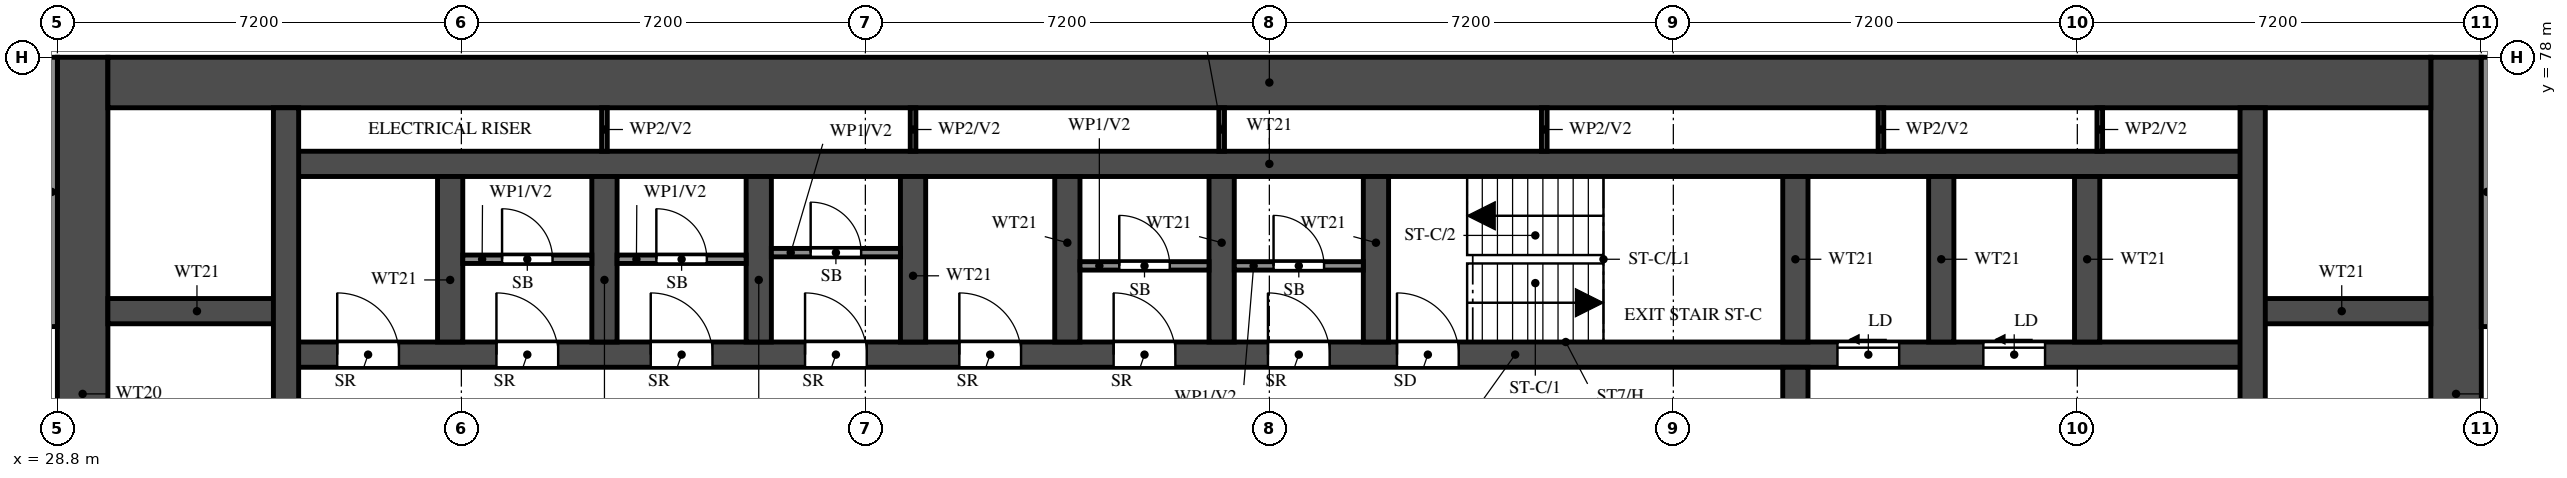
"""IFC4 building model, lengths in metres.
Left out: names, types, materials, properties, quantities, classifications, styles, units other than length and angle.
Written with IfcOpenShell. Run it as: python <this file> out.ifc"""

import sys

from ifc_helpers import new_model, si_unit, direction, frame, frame_2d, origin, place, context, subcontext, project, spatial, rectangle, extrude, element, fill, save


model = new_model("IFC4")
c1 = context("Model", 3, precision=1e-05, world=origin(), true_north=direction((0.0, 1.0)))
c2 = subcontext(c1, "Body", "Model", "MODEL_VIEW")
j1 = project(units=[si_unit("LENGTHUNIT", "METRE"), si_unit("PLANEANGLEUNIT", "RADIAN")], contexts=[c1])
p1 = place(None, origin())
s1 = spatial("IfcSite", under=j1, at=p1, CompositionType="ELEMENT")
p2 = place(p1, origin())
s2 = spatial("IfcBuilding", under=s1, at=p2, CompositionType="ELEMENT")
p3 = place(p2, frame((0.0, 0.0, 97.0)))
s3 = spatial("IfcBuildingStorey", under=s2, at=p3, CompositionType="ELEMENT", Elevation=97.0)
for number, where, z_axis, x_axis in (
    (1, (29.25, 66.0, 0.0), (0.0, 0.0, 1.0), (0.0, 1.0, 0.0)),
    (2, (71.55, 66.0, 0.0), (0.0, 0.0, 1.0), (0.0, 1.0, 0.0)),
):
    element("IfcWall", number, at=place(p3, frame(where, z_axis=z_axis, x_axis=x_axis)), inside=s3, PredefinedType="SHEAR", context=c2, shape_type="SweptSolid", body=[
        extrude(rectangle(XDim=12.0, YDim=0.9, at=frame_2d((6.0, 0.0))), origin(), (0.0, 0.0, 1.0), 3.18),
    ])
p4 = place(p3, frame((29.7, 77.55, 0.0), z_axis=(0.0, 0.0, 1.0), x_axis=(1.0, 0.0, 0.0)))
e3 = element("IfcWall", 3, at=p4, inside=s3, PredefinedType="SHEAR", context=c2, shape_type="SweptSolid", body=[
    extrude(rectangle(XDim=41.4, YDim=0.9, at=frame_2d((20.7, 0.0))), origin(), (0.0, 0.0, 1.0), 3.18),
])
p5 = place(p3, frame((32.875, 72.7, 0.0), z_axis=(0.0, 0.0, 1.0), x_axis=(1.0, 0.0, 0.0)))
e4 = element("IfcWall", 4, at=p5, inside=s3, PredefinedType="SHEAR", context=c2, shape_type="SweptSolid", body=[
    extrude(rectangle(XDim=35.05, YDim=0.45, at=frame_2d((17.525, 0.0))), origin(), (0.0, 0.0, 1.0), 3.18),
])
p6 = place(p5, frame((19.8, 0.0, 0.0)))
e5 = element("IfcOpeningElement", 5, at=p6, cuts=e4, PredefinedType="OPENING", context=c2, shape_type="SweptSolid", body=[
    extrude(rectangle(XDim=1.1, YDim=2.1, at=frame_2d((0.55, 1.05))), frame((0.0, 0.235, 0.0), z_axis=(0.0, -1.0, 0.0), x_axis=(1.0, 0.0, 0.0)), (0.0, 0.0, 1.0), 0.47),
])
p7 = place(p5, frame((27.65, 0.0, 0.0)))
e6 = element("IfcOpeningElement", 6, at=p7, cuts=e4, PredefinedType="OPENING", context=c2, shape_type="SweptSolid", body=[
    extrude(rectangle(XDim=1.1, YDim=2.1, at=frame_2d((0.55, 1.05))), frame((0.0, 0.235, 0.0), z_axis=(0.0, -1.0, 0.0), x_axis=(1.0, 0.0, 0.0)), (0.0, 0.0, 1.0), 0.47),
])
p8 = place(p5, frame((30.25, 0.0, 0.0)))
e7 = element("IfcOpeningElement", 7, at=p8, cuts=e4, PredefinedType="OPENING", context=c2, shape_type="SweptSolid", body=[
    extrude(rectangle(XDim=1.1, YDim=2.1, at=frame_2d((0.55, 1.05))), frame((0.0, 0.235, 0.0), z_axis=(0.0, -1.0, 0.0), x_axis=(1.0, 0.0, 0.0)), (0.0, 0.0, 1.0), 0.47),
])
p9 = place(p5, frame((3.75, 0.0, 0.0)))
e8 = element("IfcOpeningElement", 8, at=p9, cuts=e4, PredefinedType="OPENING", context=c2, shape_type="SweptSolid", body=[
    extrude(rectangle(XDim=1.1, YDim=2.1, at=frame_2d((0.55, 1.05))), frame((0.0, 0.235, 0.0), z_axis=(0.0, -1.0, 0.0), x_axis=(1.0, 0.0, 0.0)), (0.0, 0.0, 1.0), 0.47),
])
p10 = place(p5, frame((6.5, 0.0, 0.0)))
e9 = element("IfcOpeningElement", 9, at=p10, cuts=e4, PredefinedType="OPENING", context=c2, shape_type="SweptSolid", body=[
    extrude(rectangle(XDim=1.1, YDim=2.1, at=frame_2d((0.55, 1.05))), frame((0.0, 0.235, 0.0), z_axis=(0.0, -1.0, 0.0), x_axis=(1.0, 0.0, 0.0)), (0.0, 0.0, 1.0), 0.47),
])
p11 = place(p5, frame((9.25, 0.0, 0.0)))
e10 = element("IfcOpeningElement", 10, at=p11, cuts=e4, PredefinedType="OPENING", context=c2, shape_type="SweptSolid", body=[
    extrude(rectangle(XDim=1.1, YDim=2.1, at=frame_2d((0.55, 1.05))), frame((0.0, 0.235, 0.0), z_axis=(0.0, -1.0, 0.0), x_axis=(1.0, 0.0, 0.0)), (0.0, 0.0, 1.0), 0.47),
])
p12 = place(p5, frame((12.0, 0.0, 0.0)))
e11 = element("IfcOpeningElement", 11, at=p12, cuts=e4, PredefinedType="OPENING", context=c2, shape_type="SweptSolid", body=[
    extrude(rectangle(XDim=1.1, YDim=2.1, at=frame_2d((0.55, 1.05))), frame((0.0, 0.235, 0.0), z_axis=(0.0, -1.0, 0.0), x_axis=(1.0, 0.0, 0.0)), (0.0, 0.0, 1.0), 0.47),
])
p13 = place(p5, frame((14.75, 0.0, 0.0)))
e12 = element("IfcOpeningElement", 12, at=p13, cuts=e4, PredefinedType="OPENING", context=c2, shape_type="SweptSolid", body=[
    extrude(rectangle(XDim=1.1, YDim=2.1, at=frame_2d((0.55, 1.05))), frame((0.0, 0.235, 0.0), z_axis=(0.0, -1.0, 0.0), x_axis=(1.0, 0.0, 0.0)), (0.0, 0.0, 1.0), 0.47),
])
p14 = place(p5, frame((17.5, 0.0, 0.0)))
e13 = element("IfcOpeningElement", 13, at=p14, cuts=e4, PredefinedType="OPENING", context=c2, shape_type="SweptSolid", body=[
    extrude(rectangle(XDim=1.1, YDim=2.1, at=frame_2d((0.55, 1.05))), frame((0.0, 0.235, 0.0), z_axis=(0.0, -1.0, 0.0), x_axis=(1.0, 0.0, 0.0)), (0.0, 0.0, 1.0), 0.47),
])
p15 = place(p5, frame((0.913, 0.0, 0.0)))
e14 = element("IfcOpeningElement", 14, at=p15, cuts=e4, PredefinedType="OPENING", context=c2, shape_type="SweptSolid", body=[
    extrude(rectangle(XDim=1.1, YDim=2.1, at=frame_2d((0.55, 1.05))), frame((0.0, 0.235, 0.0), z_axis=(0.0, -1.0, 0.0), x_axis=(1.0, 0.0, 0.0)), (0.0, 0.0, 1.0), 0.47),
])
p16 = place(p3, frame((32.875, 76.1, 0.0), z_axis=(0.0, 0.0, 1.0), x_axis=(1.0, 0.0, 0.0)))
e15 = element("IfcWall", 15, at=p16, inside=s3, PredefinedType="SHEAR", context=c2, shape_type="SweptSolid", body=[
    extrude(rectangle(XDim=35.05, YDim=0.45, at=frame_2d((17.525, 0.0))), origin(), (0.0, 0.0, 1.0), 3.18),
])
for number, where, z_axis, x_axis in (
    (16, (29.7, 73.475, 0.0), (0.0, 0.0, 1.0), (1.0, 0.0, 0.0)),
    (17, (67.925, 73.475, 0.0), (0.0, 0.0, 1.0), (1.0, 0.0, 0.0)),
):
    element("IfcWall", number, at=place(p3, frame(where, z_axis=z_axis, x_axis=x_axis)), inside=s3, PredefinedType="SHEAR", context=c2, shape_type="SweptSolid", body=[
        extrude(rectangle(XDim=3.175, YDim=0.45, at=frame_2d((1.587, 0.0))), origin(), (0.0, 0.0, 1.0), 3.18),
    ])
p17 = place(p3, frame((32.875, 66.45, 0.0), z_axis=(0.0, 0.0, 1.0), x_axis=(0.0, 1.0, 0.0)))
e18 = element("IfcWall", 18, at=p17, inside=s3, PredefinedType="SHEAR", context=c2, shape_type="SweptSolid", body=[
    extrude(rectangle(XDim=10.65, YDim=0.45, at=frame_2d((5.325, 0.0))), origin(), (0.0, 0.0, 1.0), 3.18),
])
p18 = place(p3, frame((67.925, 66.45, 0.0), z_axis=(0.0, 0.0, 1.0), x_axis=(0.0, 1.0, 0.0)))
e19 = element("IfcWall", 19, at=p18, inside=s3, PredefinedType="SHEAR", context=c2, shape_type="SweptSolid", body=[
    extrude(rectangle(XDim=10.65, YDim=0.45, at=frame_2d((5.325, 0.0))), origin(), (0.0, 0.0, 1.0), 3.18),
])
p19 = place(p18, frame((0.15, 0.0, 0.0)))
e20 = element("IfcOpeningElement", 20, at=p19, cuts=e19, PredefinedType="OPENING", context=c2, shape_type="SweptSolid", body=[
    extrude(rectangle(XDim=1.1, YDim=2.1, at=frame_2d((0.55, 1.05))), frame((0.0, 0.235, 0.0), z_axis=(0.0, -1.0, 0.0), x_axis=(1.0, 0.0, 0.0)), (0.0, 0.0, 1.0), 0.47),
])
p20 = place(p3, frame((59.775, 66.45, 0.0), z_axis=(0.0, 0.0, 1.0), x_axis=(0.0, 1.0, 0.0)))
e21 = element("IfcWall", 21, at=p20, inside=s3, PredefinedType="SHEAR", context=c2, shape_type="SweptSolid", body=[
    extrude(rectangle(XDim=6.025, YDim=0.45, at=frame_2d((3.013, 0.0))), origin(), (0.0, 0.0, 1.0), 3.18),
])
p21 = place(p20, frame((3.85, 0.0, 0.0)))
e22 = element("IfcOpeningElement", 22, at=p21, cuts=e21, PredefinedType="OPENING", context=c2, shape_type="SweptSolid", body=[
    extrude(rectangle(XDim=1.2, YDim=2.1, at=frame_2d((0.6, 1.05))), frame((0.0, 0.235, 0.0), z_axis=(0.0, -1.0, 0.0), x_axis=(1.0, 0.0, 0.0)), (0.0, 0.0, 1.0), 0.47),
])
for number, where, z_axis, x_axis in (
    (23, (59.775, 72.925, 0.0), (0.0, 0.0, 1.0), (0.0, 1.0, 0.0)),
    (24, (35.8, 72.925, 0.0), (0.0, 0.0, 1.0), (0.0, 1.0, 0.0)),
    (25, (38.55, 72.925, 0.0), (0.0, 0.0, 1.0), (0.0, 1.0, 0.0)),
    (26, (41.3, 72.925, 0.0), (0.0, 0.0, 1.0), (0.0, 1.0, 0.0)),
    (27, (44.05, 72.925, 0.0), (0.0, 0.0, 1.0), (0.0, 1.0, 0.0)),
    (28, (46.8, 72.925, 0.0), (0.0, 0.0, 1.0), (0.0, 1.0, 0.0)),
    (29, (49.55, 72.925, 0.0), (0.0, 0.0, 1.0), (0.0, 1.0, 0.0)),
    (30, (52.3, 72.925, 0.0), (0.0, 0.0, 1.0), (0.0, 1.0, 0.0)),
    (31, (62.375, 72.925, 0.0), (0.0, 0.0, 1.0), (0.0, 1.0, 0.0)),
    (32, (64.975, 72.925, 0.0), (0.0, 0.0, 1.0), (0.0, 1.0, 0.0)),
):
    element("IfcWall", number, at=place(p3, frame(where, z_axis=z_axis, x_axis=x_axis)), inside=s3, PredefinedType="SHEAR", context=c2, shape_type="SweptSolid", body=[
        extrude(rectangle(XDim=2.95, YDim=0.45, at=frame_2d((1.475, 0.0))), origin(), (0.0, 0.0, 1.0), 3.18),
    ])
p22 = place(p3, frame((36.025, 74.4, 0.0), z_axis=(0.0, 0.0, 1.0), x_axis=(1.0, 0.0, 0.0)))
e33 = element("IfcWall", 33, at=p22, inside=s3, PredefinedType="PARTITIONING", context=c2, shape_type="SweptSolid", body=[
    extrude(rectangle(XDim=2.3, YDim=0.15, at=frame_2d((1.15, 0.0))), origin(), (0.0, 0.0, 1.0), 3.18),
])
p23 = place(p22, frame((0.7, 0.0, 0.0)))
e34 = element("IfcOpeningElement", 34, at=p23, cuts=e33, PredefinedType="OPENING", context=c2, shape_type="SweptSolid", body=[
    extrude(rectangle(XDim=0.9, YDim=2.1, at=frame_2d((0.45, 1.05))), frame((0.0, 0.085, 0.0), z_axis=(0.0, -1.0, 0.0), x_axis=(1.0, 0.0, 0.0)), (0.0, 0.0, 1.0), 0.17),
])
p24 = place(p3, frame((38.775, 74.4, 0.0), z_axis=(0.0, 0.0, 1.0), x_axis=(1.0, 0.0, 0.0)))
e35 = element("IfcWall", 35, at=p24, inside=s3, PredefinedType="PARTITIONING", context=c2, shape_type="SweptSolid", body=[
    extrude(rectangle(XDim=2.3, YDim=0.15, at=frame_2d((1.15, 0.0))), origin(), (0.0, 0.0, 1.0), 3.18),
])
p25 = place(p24, frame((0.7, 0.0, 0.0)))
e36 = element("IfcOpeningElement", 36, at=p25, cuts=e35, PredefinedType="OPENING", context=c2, shape_type="SweptSolid", body=[
    extrude(rectangle(XDim=0.9, YDim=2.1, at=frame_2d((0.45, 1.05))), frame((0.0, 0.085, 0.0), z_axis=(0.0, -1.0, 0.0), x_axis=(1.0, 0.0, 0.0)), (0.0, 0.0, 1.0), 0.17),
])
p26 = place(p3, frame((41.525, 74.518, 0.0), z_axis=(0.0, 0.0, 1.0), x_axis=(1.0, 0.0, 0.0)))
e37 = element("IfcWall", 37, at=p26, inside=s3, PredefinedType="PARTITIONING", context=c2, shape_type="SweptSolid", body=[
    extrude(rectangle(XDim=2.3, YDim=0.15, at=frame_2d((1.15, 0.0))), origin(), (0.0, 0.0, 1.0), 3.18),
])
p27 = place(p26, frame((0.7, 0.0, 0.0)))
e38 = element("IfcOpeningElement", 38, at=p27, cuts=e37, PredefinedType="OPENING", context=c2, shape_type="SweptSolid", body=[
    extrude(rectangle(XDim=0.9, YDim=2.1, at=frame_2d((0.45, 1.05))), frame((0.0, 0.085, 0.0), z_axis=(0.0, -1.0, 0.0), x_axis=(1.0, 0.0, 0.0)), (0.0, 0.0, 1.0), 0.17),
])
p28 = place(p3, frame((47.025, 74.282, 0.0), z_axis=(0.0, 0.0, 1.0), x_axis=(1.0, 0.0, 0.0)))
e39 = element("IfcWall", 39, at=p28, inside=s3, PredefinedType="PARTITIONING", context=c2, shape_type="SweptSolid", body=[
    extrude(rectangle(XDim=2.3, YDim=0.15, at=frame_2d((1.15, 0.0))), origin(), (0.0, 0.0, 1.0), 3.18),
])
p29 = place(p28, frame((0.7, 0.0, 0.0)))
e40 = element("IfcOpeningElement", 40, at=p29, cuts=e39, PredefinedType="OPENING", context=c2, shape_type="SweptSolid", body=[
    extrude(rectangle(XDim=0.9, YDim=2.1, at=frame_2d((0.45, 1.05))), frame((0.0, 0.085, 0.0), z_axis=(0.0, -1.0, 0.0), x_axis=(1.0, 0.0, 0.0)), (0.0, 0.0, 1.0), 0.17),
])
p30 = place(p3, frame((49.775, 74.282, 0.0), z_axis=(0.0, 0.0, 1.0), x_axis=(1.0, 0.0, 0.0)))
e41 = element("IfcWall", 41, at=p30, inside=s3, PredefinedType="PARTITIONING", context=c2, shape_type="SweptSolid", body=[
    extrude(rectangle(XDim=2.3, YDim=0.15, at=frame_2d((1.15, 0.0))), origin(), (0.0, 0.0, 1.0), 3.18),
])
p31 = place(p30, frame((0.7, 0.0, 0.0)))
e42 = element("IfcOpeningElement", 42, at=p31, cuts=e41, PredefinedType="OPENING", context=c2, shape_type="SweptSolid", body=[
    extrude(rectangle(XDim=0.9, YDim=2.1, at=frame_2d((0.45, 1.05))), frame((0.0, 0.085, 0.0), z_axis=(0.0, -1.0, 0.0), x_axis=(1.0, 0.0, 0.0)), (0.0, 0.0, 1.0), 0.17),
])
for number, where, z_axis, x_axis in (
    (43, (38.55, 76.325, 0.0), (0.0, 0.0, 1.0), (0.0, 1.0, 0.0)),
    (44, (44.05, 76.325, 0.0), (0.0, 0.0, 1.0), (0.0, 1.0, 0.0)),
    (45, (49.55, 76.325, 0.0), (0.0, 0.0, 1.0), (0.0, 1.0, 0.0)),
    (46, (55.3, 76.325, 0.0), (0.0, 0.0, 1.0), (0.0, 1.0, 0.0)),
    (47, (61.3, 76.325, 0.0), (0.0, 0.0, 1.0), (0.0, 1.0, 0.0)),
    (48, (65.2, 76.325, 0.0), (0.0, 0.0, 1.0), (0.0, 1.0, 0.0)),
):
    element("IfcWall", number, at=place(p3, frame(where, z_axis=z_axis, x_axis=x_axis)), inside=s3, PredefinedType="PARTITIONING", context=c2, shape_type="SweptSolid", body=[
        extrude(rectangle(XDim=0.775, YDim=0.1, at=frame_2d((0.388, 0.0))), origin(), (0.0, 0.0, 1.0), 3.18),
    ])
for number, where, z_axis, x_axis in (
    (49, (28.7, 73.2, 0.0), (0.0, 0.0, 1.0), (0.0, 1.0, 0.0)),
    (50, (72.1, 73.2, 0.0), (0.0, 0.0, 1.0), (0.0, 1.0, 0.0)),
):
    element("IfcWall", number, at=place(p3, frame(where, z_axis=z_axis, x_axis=x_axis)), inside=s3, PredefinedType="SOLIDWALL", context=c2, shape_type="SweptSolid", body=[
        extrude(rectangle(XDim=4.8, YDim=0.2, at=frame_2d((2.4, 0.0))), origin(), (0.0, 0.0, 1.0), 3.18),
    ])
p32 = place(p6, origin())
e51 = element("IfcDoor", 51, at=p32, inside=s3, OperationType="SINGLE_SWING_LEFT", PredefinedType="DOOR", context=c2, shape_type="SweptSolid", body=[
    extrude(rectangle(XDim=1.1, YDim=2.1, at=frame_2d((0.55, 1.05))), frame((0.0, 0.025, 0.0), z_axis=(0.0, -1.0, 0.0), x_axis=(1.0, 0.0, 0.0)), (0.0, 0.0, 1.0), 0.05),
])
fill(e5, e51)
p33 = place(p7, origin())
e52 = element("IfcDoor", 52, at=p33, inside=s3, OperationType="SLIDING_TO_LEFT", PredefinedType="DOOR", context=c2, shape_type="SweptSolid", body=[
    extrude(rectangle(XDim=1.1, YDim=2.1, at=frame_2d((0.55, 1.05))), frame((0.0, 0.025, 0.0), z_axis=(0.0, -1.0, 0.0), x_axis=(1.0, 0.0, 0.0)), (0.0, 0.0, 1.0), 0.05),
])
fill(e6, e52)
p34 = place(p8, origin())
e53 = element("IfcDoor", 53, at=p34, inside=s3, OperationType="SLIDING_TO_LEFT", PredefinedType="DOOR", context=c2, shape_type="SweptSolid", body=[
    extrude(rectangle(XDim=1.1, YDim=2.1, at=frame_2d((0.55, 1.05))), frame((0.0, 0.025, 0.0), z_axis=(0.0, -1.0, 0.0), x_axis=(1.0, 0.0, 0.0)), (0.0, 0.0, 1.0), 0.05),
])
fill(e7, e53)
p35 = place(p9, origin())
e54 = element("IfcDoor", 54, at=p35, inside=s3, OperationType="SINGLE_SWING_LEFT", PredefinedType="DOOR", context=c2, shape_type="SweptSolid", body=[
    extrude(rectangle(XDim=1.1, YDim=2.1, at=frame_2d((0.55, 1.05))), frame((0.0, 0.025, 0.0), z_axis=(0.0, -1.0, 0.0), x_axis=(1.0, 0.0, 0.0)), (0.0, 0.0, 1.0), 0.05),
])
fill(e8, e54)
p36 = place(p23, origin())
e55 = element("IfcDoor", 55, at=p36, inside=s3, OperationType="SINGLE_SWING_LEFT", PredefinedType="DOOR", context=c2, shape_type="SweptSolid", body=[
    extrude(rectangle(XDim=0.9, YDim=2.1, at=frame_2d((0.45, 1.05))), frame((0.0, 0.025, 0.0), z_axis=(0.0, -1.0, 0.0), x_axis=(1.0, 0.0, 0.0)), (0.0, 0.0, 1.0), 0.05),
])
fill(e34, e55)
p37 = place(p10, origin())
e56 = element("IfcDoor", 56, at=p37, inside=s3, OperationType="SINGLE_SWING_LEFT", PredefinedType="DOOR", context=c2, shape_type="SweptSolid", body=[
    extrude(rectangle(XDim=1.1, YDim=2.1, at=frame_2d((0.55, 1.05))), frame((0.0, 0.025, 0.0), z_axis=(0.0, -1.0, 0.0), x_axis=(1.0, 0.0, 0.0)), (0.0, 0.0, 1.0), 0.05),
])
fill(e9, e56)
p38 = place(p25, origin())
e57 = element("IfcDoor", 57, at=p38, inside=s3, OperationType="SINGLE_SWING_RIGHT", PredefinedType="DOOR", context=c2, shape_type="SweptSolid", body=[
    extrude(rectangle(XDim=0.9, YDim=2.1, at=frame_2d((0.45, 1.05))), frame((0.0, 0.025, 0.0), z_axis=(0.0, -1.0, 0.0), x_axis=(1.0, 0.0, 0.0)), (0.0, 0.0, 1.0), 0.05),
])
fill(e36, e57)
p39 = place(p11, origin())
e58 = element("IfcDoor", 58, at=p39, inside=s3, OperationType="SINGLE_SWING_LEFT", PredefinedType="DOOR", context=c2, shape_type="SweptSolid", body=[
    extrude(rectangle(XDim=1.1, YDim=2.1, at=frame_2d((0.55, 1.05))), frame((0.0, 0.025, 0.0), z_axis=(0.0, -1.0, 0.0), x_axis=(1.0, 0.0, 0.0)), (0.0, 0.0, 1.0), 0.05),
])
fill(e10, e58)
p40 = place(p27, origin())
e59 = element("IfcDoor", 59, at=p40, inside=s3, OperationType="SINGLE_SWING_RIGHT", PredefinedType="DOOR", context=c2, shape_type="SweptSolid", body=[
    extrude(rectangle(XDim=0.9, YDim=2.1, at=frame_2d((0.45, 1.05))), frame((0.0, 0.025, 0.0), z_axis=(0.0, -1.0, 0.0), x_axis=(1.0, 0.0, 0.0)), (0.0, 0.0, 1.0), 0.05),
])
fill(e38, e59)
p41 = place(p12, origin())
e60 = element("IfcDoor", 60, at=p41, inside=s3, OperationType="SINGLE_SWING_LEFT", PredefinedType="DOOR", context=c2, shape_type="SweptSolid", body=[
    extrude(rectangle(XDim=1.1, YDim=2.1, at=frame_2d((0.55, 1.05))), frame((0.0, 0.025, 0.0), z_axis=(0.0, -1.0, 0.0), x_axis=(1.0, 0.0, 0.0)), (0.0, 0.0, 1.0), 0.05),
])
fill(e11, e60)
p42 = place(p13, origin())
e61 = element("IfcDoor", 61, at=p42, inside=s3, OperationType="SINGLE_SWING_LEFT", PredefinedType="DOOR", context=c2, shape_type="SweptSolid", body=[
    extrude(rectangle(XDim=1.1, YDim=2.1, at=frame_2d((0.55, 1.05))), frame((0.0, 0.025, 0.0), z_axis=(0.0, -1.0, 0.0), x_axis=(1.0, 0.0, 0.0)), (0.0, 0.0, 1.0), 0.05),
])
fill(e12, e61)
p43 = place(p29, origin())
e62 = element("IfcDoor", 62, at=p43, inside=s3, OperationType="SINGLE_SWING_LEFT", PredefinedType="DOOR", context=c2, shape_type="SweptSolid", body=[
    extrude(rectangle(XDim=0.9, YDim=2.1, at=frame_2d((0.45, 1.05))), frame((0.0, 0.025, 0.0), z_axis=(0.0, -1.0, 0.0), x_axis=(1.0, 0.0, 0.0)), (0.0, 0.0, 1.0), 0.05),
])
fill(e40, e62)
p44 = place(p14, origin())
e63 = element("IfcDoor", 63, at=p44, inside=s3, OperationType="SINGLE_SWING_LEFT", PredefinedType="DOOR", context=c2, shape_type="SweptSolid", body=[
    extrude(rectangle(XDim=1.1, YDim=2.1, at=frame_2d((0.55, 1.05))), frame((0.0, 0.025, 0.0), z_axis=(0.0, -1.0, 0.0), x_axis=(1.0, 0.0, 0.0)), (0.0, 0.0, 1.0), 0.05),
])
fill(e13, e63)
p45 = place(p31, origin())
e64 = element("IfcDoor", 64, at=p45, inside=s3, OperationType="SINGLE_SWING_RIGHT", PredefinedType="DOOR", context=c2, shape_type="SweptSolid", body=[
    extrude(rectangle(XDim=0.9, YDim=2.1, at=frame_2d((0.45, 1.05))), frame((0.0, 0.025, 0.0), z_axis=(0.0, -1.0, 0.0), x_axis=(1.0, 0.0, 0.0)), (0.0, 0.0, 1.0), 0.05),
])
fill(e42, e64)
p46 = place(p15, origin())
e65 = element("IfcDoor", 65, at=p46, inside=s3, OperationType="SINGLE_SWING_LEFT", PredefinedType="DOOR", context=c2, shape_type="SweptSolid", body=[
    extrude(rectangle(XDim=1.1, YDim=2.1, at=frame_2d((0.55, 1.05))), frame((0.0, 0.025, 0.0), z_axis=(0.0, -1.0, 0.0), x_axis=(1.0, 0.0, 0.0)), (0.0, 0.0, 1.0), 0.05),
])
fill(e14, e65)
save(model, sys.argv[1])
